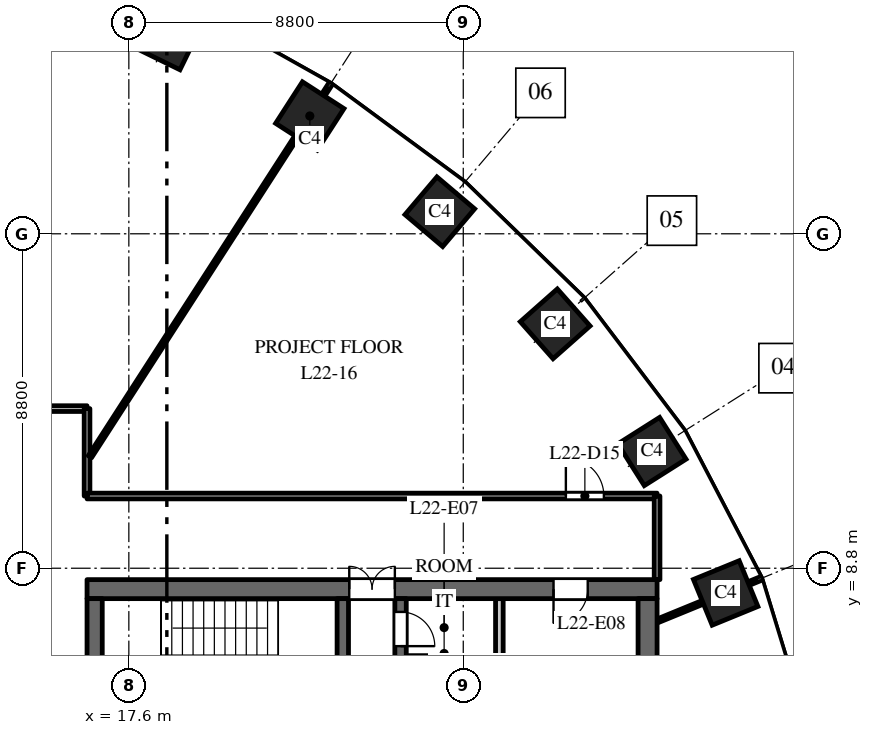
"""IFC4 building model, lengths in metres.
Left out: names, types, materials, properties, quantities, classifications, styles, units other than length and angle.
Written with IfcOpenShell. Run it as: python <this file> out.ifc"""

import sys

from ifc_helpers import new_model, si_unit, direction, frame, frame_2d, origin, origin_2d, place, context, subcontext, project, spatial, rectangle, extrude, element, fill, save


model = new_model("IFC4")
c1 = context("Model", 3, precision=1e-05, world=origin(), true_north=direction((0.0, 1.0)))
c2 = subcontext(c1, "Body", "Model", "MODEL_VIEW")
j1 = project(units=[si_unit("LENGTHUNIT", "METRE"), si_unit("PLANEANGLEUNIT", "RADIAN")], contexts=[c1])
p1 = place(None, origin())
s1 = spatial("IfcSite", under=j1, at=p1, CompositionType="ELEMENT")
p2 = place(p1, origin())
s2 = spatial("IfcBuilding", under=s1, at=p2, CompositionType="ELEMENT")
p3 = place(p2, frame((0.0, 0.0, 100.0)))
s3 = spatial("IfcBuildingStorey", under=s2, at=p3, CompositionType="ELEMENT", Elevation=100.0)
for number, where, z_axis, x_axis in (
    (1, (33.305, 8.149, 0.0), (0.0, 0.0, 1.0), (-0.379, 0.925, 0.0)),
    (2, (31.365, 11.871, 0.0), (0.0, 0.0, 1.0), (-0.535, 0.845, 0.0)),
    (3, (28.819, 15.23, 0.0), (0.0, 0.0, 1.0), (-0.663, 0.749, 0.0)),
    (4, (25.783, 18.18, 0.0), (0.0, 0.0, 1.0), (-0.763, 0.646, 0.0)),
    (5, (22.362, 20.7, 0.0), (0.0, 0.0, 1.0), (-0.84, 0.542, 0.0)),
    (6, (18.646, 22.785, 0.0), (0.0, 0.0, 1.0), (-0.898, 0.439, 0.0)),
):
    element("IfcColumn", number, at=place(p3, frame(where, z_axis=z_axis, x_axis=x_axis)), inside=s3, PredefinedType="COLUMN", context=c2, shape_type="SweptSolid", body=[
        extrude(rectangle(XDim=1.3, YDim=1.3, at=origin_2d()), origin(), (0.0, 0.0, 1.0), 4.0),
    ])
p4 = place(p3, frame((16.5, 8.25, 0.0), z_axis=(0.0, 0.0, 1.0), x_axis=(1.0, 0.0, 0.0)))
e7 = element("IfcWall", 7, at=p4, inside=s3, PredefinedType="SHEAR", context=c2, shape_type="SweptSolid", body=[
    extrude(rectangle(XDim=15.0, YDim=0.5, at=frame_2d((7.5, 0.0))), origin(), (0.0, 0.0, 1.0), 3.7),
])
p5 = place(p4, frame((6.9, 0.0, 0.0)))
e8 = element("IfcOpeningElement", 8, at=p5, cuts=e7, PredefinedType="OPENING", context=c2, shape_type="SweptSolid", body=[
    extrude(rectangle(XDim=1.2, YDim=2.1, at=frame_2d((0.6, 1.05))), frame((0.0, 0.26, 0.0), z_axis=(0.0, -1.0, 0.0), x_axis=(1.0, 0.0, 0.0)), (0.0, 0.0, 1.0), 0.52),
])
p6 = place(p4, frame((12.275, 0.0, 0.0)))
e9 = element("IfcOpeningElement", 9, at=p6, cuts=e7, PredefinedType="OPENING", context=c2, shape_type="SweptSolid", body=[
    extrude(rectangle(XDim=0.9, YDim=2.1, at=frame_2d((0.45, 1.05))), frame((0.0, 0.26, 0.0), z_axis=(0.0, -1.0, 0.0), x_axis=(1.0, 0.0, 0.0)), (0.0, 0.0, 1.0), 0.52),
])
p7 = place(p3, frame((24.75, -8.0, 0.0), z_axis=(0.0, 0.0, 1.0), x_axis=(0.0, 1.0, 0.0)))
e10 = element("IfcWall", 10, at=p7, inside=s3, PredefinedType="SHEAR", context=c2, shape_type="SweptSolid", body=[
    extrude(rectangle(XDim=16.0, YDim=0.3, at=frame_2d((8.0, 0.0))), origin(), (0.0, 0.0, 1.0), 3.7),
])
p8 = place(p7, frame((4.425, 0.0, 0.0)))
e11 = element("IfcOpeningElement", 11, at=p8, cuts=e10, PredefinedType="OPENING", context=c2, shape_type="SweptSolid", body=[
    extrude(rectangle(XDim=1.1, YDim=2.1, at=frame_2d((0.55, 1.05))), frame((0.0, 0.16, 0.0), z_axis=(0.0, -1.0, 0.0), x_axis=(1.0, 0.0, 0.0)), (0.0, 0.0, 1.0), 0.32),
])
p9 = place(p7, frame((7.45, 0.0, 0.0)))
e12 = element("IfcOpeningElement", 12, at=p9, cuts=e10, PredefinedType="OPENING", context=c2, shape_type="SweptSolid", body=[
    extrude(rectangle(XDim=1.1, YDim=2.1, at=frame_2d((0.55, 1.05))), frame((0.0, 0.16, 0.0), z_axis=(0.0, -1.0, 0.0), x_axis=(1.0, 0.0, 0.0)), (0.0, 0.0, 1.0), 0.32),
])
p10 = place(p7, frame((10.425, 0.0, 0.0)))
e13 = element("IfcOpeningElement", 13, at=p10, cuts=e10, PredefinedType="OPENING", context=c2, shape_type="SweptSolid", body=[
    extrude(rectangle(XDim=1.2, YDim=2.1, at=frame_2d((0.6, 1.05))), frame((0.0, 0.16, 0.0), z_axis=(0.0, -1.0, 0.0), x_axis=(1.0, 0.0, 0.0)), (0.0, 0.0, 1.0), 0.32),
])
p11 = place(p7, frame((13.125, 0.0, 0.0)))
e14 = element("IfcOpeningElement", 14, at=p11, cuts=e10, PredefinedType="OPENING", context=c2, shape_type="SweptSolid", body=[
    extrude(rectangle(XDim=0.9, YDim=2.1, at=frame_2d((0.45, 1.05))), frame((0.0, 0.16, 0.0), z_axis=(0.0, -1.0, 0.0), x_axis=(1.0, 0.0, 0.0)), (0.0, 0.0, 1.0), 0.32),
])
p12 = place(p7, frame((14.75, 0.0, 0.0)))
e15 = element("IfcOpeningElement", 15, at=p12, cuts=e10, PredefinedType="OPENING", context=c2, shape_type="SweptSolid", body=[
    extrude(rectangle(XDim=0.9, YDim=2.1, at=frame_2d((0.45, 1.05))), frame((0.0, 0.16, 0.0), z_axis=(0.0, -1.0, 0.0), x_axis=(1.0, 0.0, 0.0)), (0.0, 0.0, 1.0), 0.32),
])
p13 = place(p7, frame((1.35, 0.0, 0.0)))
e16 = element("IfcOpeningElement", 16, at=p13, cuts=e10, PredefinedType="OPENING", context=c2, shape_type="SweptSolid", body=[
    extrude(rectangle(XDim=0.9, YDim=2.1, at=frame_2d((0.45, 1.05))), frame((0.0, 0.16, 0.0), z_axis=(0.0, -1.0, 0.0), x_axis=(1.0, 0.0, 0.0)), (0.0, 0.0, 1.0), 0.32),
])
p14 = place(p3, frame((16.7, -8.0, 0.0), z_axis=(0.0, 0.0, 1.0), x_axis=(0.0, 1.0, 0.0)))
e17 = element("IfcWall", 17, at=p14, inside=s3, PredefinedType="SHEAR", context=c2, shape_type="SweptSolid", body=[
    extrude(rectangle(XDim=16.0, YDim=0.4, at=frame_2d((8.0, 0.0))), origin(), (0.0, 0.0, 1.0), 3.7),
])
p15 = place(p3, frame((31.25, -8.0, 0.0), z_axis=(0.0, 0.0, 1.0), x_axis=(0.0, 1.0, 0.0)))
e18 = element("IfcWall", 18, at=p15, inside=s3, PredefinedType="SHEAR", context=c2, shape_type="SweptSolid", body=[
    extrude(rectangle(XDim=16.0, YDim=0.5, at=frame_2d((8.0, 0.0))), origin(), (0.0, 0.0, 1.0), 3.7),
])
p16 = place(p3, frame((27.35, 4.75, 0.0), z_axis=(0.0, 0.0, 1.0), x_axis=(0.0, 1.0, 0.0)))
e19 = element("IfcWall", 19, at=p16, inside=s3, PredefinedType="PARTITIONING", context=c2, shape_type="SweptSolid", body=[
    extrude(rectangle(XDim=3.25, YDim=0.2, at=frame_2d((1.625, 0.0))), origin(), (0.0, 0.0, 1.0), 3.7),
])
p17 = place(p3, frame((23.23, 2.25, 0.0), z_axis=(0.0, 0.0, 1.0), x_axis=(0.0, 1.0, 0.0)))
e20 = element("IfcWall", 20, at=p17, inside=s3, PredefinedType="SHEAR", context=c2, shape_type="SweptSolid", body=[
    extrude(rectangle(XDim=5.75, YDim=0.3, at=frame_2d((2.875, 0.0))), origin(), (0.0, 0.0, 1.0), 3.7),
])
p18 = place(p17, frame((0.6, 0.0, 0.0)))
e21 = element("IfcOpeningElement", 21, at=p18, cuts=e20, PredefinedType="OPENING", context=c2, shape_type="SweptSolid", body=[
    extrude(rectangle(XDim=1.0, YDim=2.1, at=frame_2d((0.5, 1.05))), frame((0.0, 0.16, 0.0), z_axis=(0.0, -1.0, 0.0), x_axis=(1.0, 0.0, 0.0)), (0.0, 0.0, 1.0), 0.32),
])
p19 = place(p3, frame((1.299, 13.0, 0.0), z_axis=(0.0, 0.0, 1.0), x_axis=(1.0, 0.0, 0.0)))
e22 = element("IfcWall", 22, at=p19, inside=s3, PredefinedType="PARTITIONING", context=c2, shape_type="SweptSolid", body=[
    extrude(rectangle(XDim=15.201, YDim=0.15, at=frame_2d((7.601, 0.0))), origin(), (0.0, 0.0, 1.0), 2.85),
])
p20 = place(p19, frame((0.551, 0.0, 0.0)))
e23 = element("IfcOpeningElement", 23, at=p20, cuts=e22, PredefinedType="OPENING", context=c2, shape_type="SweptSolid", body=[
    extrude(rectangle(XDim=1.0, YDim=2.1, at=frame_2d((0.5, 1.05))), frame((0.0, 0.085, 0.0), z_axis=(0.0, -1.0, 0.0), x_axis=(1.0, 0.0, 0.0)), (0.0, 0.0, 1.0), 0.17),
])
p21 = place(p3, frame((16.5, 10.7, 0.0), z_axis=(0.0, 0.0, 1.0), x_axis=(0.0, 1.0, 0.0)))
e24 = element("IfcWall", 24, at=p21, inside=s3, PredefinedType="PARTITIONING", context=c2, shape_type="SweptSolid", body=[
    extrude(rectangle(XDim=2.3, YDim=0.15, at=frame_2d((1.15, 0.0))), origin(), (0.0, 0.0, 1.0), 3.7),
])
p22 = place(p3, frame((16.5, 10.7, 0.0), z_axis=(0.0, 0.0, 1.0), x_axis=(1.0, 0.0, 0.0)))
e25 = element("IfcWall", 25, at=p22, inside=s3, PredefinedType="PARTITIONING", context=c2, shape_type="SweptSolid", body=[
    extrude(rectangle(XDim=15.0, YDim=0.15, at=frame_2d((7.5, 0.0))), origin(), (0.0, 0.0, 1.0), 2.75),
])
p23 = place(p22, frame((12.6, 0.0, 0.0)))
e26 = element("IfcOpeningElement", 26, at=p23, cuts=e25, PredefinedType="OPENING", context=c2, shape_type="SweptSolid", body=[
    extrude(rectangle(XDim=1.0, YDim=2.1, at=frame_2d((0.5, 1.05))), frame((0.0, 0.085, 0.0), z_axis=(0.0, -1.0, 0.0), x_axis=(1.0, 0.0, 0.0)), (0.0, 0.0, 1.0), 0.17),
])
p24 = place(p3, frame((16.575, 11.733, 0.0), z_axis=(0.0, 0.0, 1.0), x_axis=(0.54222594427, 0.840232720953, 0.0)))
e27 = element("IfcWall", 27, at=p24, inside=s3, PredefinedType="PARTITIONING", context=c2, shape_type="SweptSolid", body=[
    extrude(rectangle(XDim=11.674, YDim=0.1, at=frame_2d((5.837, 0.0))), origin(), (0.0, 0.0, 1.0), 3.7),
])
p25 = place(p3, frame((31.5, 7.41, 0.0), z_axis=(0.0, 0.0, 1.0), x_axis=(0.925344112436, 0.379128307542, 0.0)))
e28 = element("IfcWall", 28, at=p25, inside=s3, PredefinedType="PARTITIONING", context=c2, shape_type="SweptSolid", body=[
    extrude(rectangle(XDim=2.954, YDim=0.1, at=frame_2d((1.477, 0.0))), origin(), (0.0, 0.0, 1.0), 3.7),
])
p26 = place(p3, frame((31.5, 8.5, 0.0), z_axis=(0.0, 0.0, 1.0), x_axis=(0.0, 1.0, 0.0)))
e29 = element("IfcWall", 29, at=p26, inside=s3, PredefinedType="PARTITIONING", context=c2, shape_type="SweptSolid", body=[
    extrude(rectangle(XDim=2.2, YDim=0.15, at=frame_2d((1.1, 0.0))), origin(), (0.0, 0.0, 1.0), 2.9),
])
p27 = place(p5, origin())
e30 = element("IfcDoor", 30, at=p27, inside=s3, OperationType="DOUBLE_DOOR_DOUBLE_SWING", PredefinedType="DOOR", context=c2, shape_type="SweptSolid", body=[
    extrude(rectangle(XDim=1.2, YDim=2.1, at=frame_2d((0.6, 1.05))), frame((0.0, 0.025, 0.0), z_axis=(0.0, -1.0, 0.0), x_axis=(1.0, 0.0, 0.0)), (0.0, 0.0, 1.0), 0.05),
])
fill(e8, e30)
p28 = place(p12, origin())
e31 = element("IfcDoor", 31, at=p28, inside=s3, OperationType="SINGLE_SWING_LEFT", PredefinedType="DOOR", context=c2, shape_type="SweptSolid", body=[
    extrude(rectangle(XDim=0.9, YDim=2.1, at=frame_2d((0.45, 1.05))), frame((0.0, 0.025, 0.0), z_axis=(0.0, -1.0, 0.0), x_axis=(1.0, 0.0, 0.0)), (0.0, 0.0, 1.0), 0.05),
])
fill(e15, e31)
p29 = place(p6, origin())
e32 = element("IfcDoor", 32, at=p29, inside=s3, OperationType="SINGLE_SWING_LEFT", PredefinedType="DOOR", context=c2, shape_type="SweptSolid", body=[
    extrude(rectangle(XDim=0.9, YDim=2.1, at=frame_2d((0.45, 1.05))), frame((0.0, 0.025, 0.0), z_axis=(0.0, -1.0, 0.0), x_axis=(1.0, 0.0, 0.0)), (0.0, 0.0, 1.0), 0.05),
])
fill(e9, e32)
p30 = place(p23, origin())
e33 = element("IfcDoor", 33, at=p30, inside=s3, OperationType="SINGLE_SWING_LEFT", PredefinedType="DOOR", context=c2, shape_type="SweptSolid", body=[
    extrude(rectangle(XDim=1.0, YDim=2.1, at=frame_2d((0.5, 1.05))), frame((0.0, 0.025, 0.0), z_axis=(0.0, -1.0, 0.0), x_axis=(1.0, 0.0, 0.0)), (0.0, 0.0, 1.0), 0.05),
])
fill(e26, e33)
save(model, sys.argv[1])
